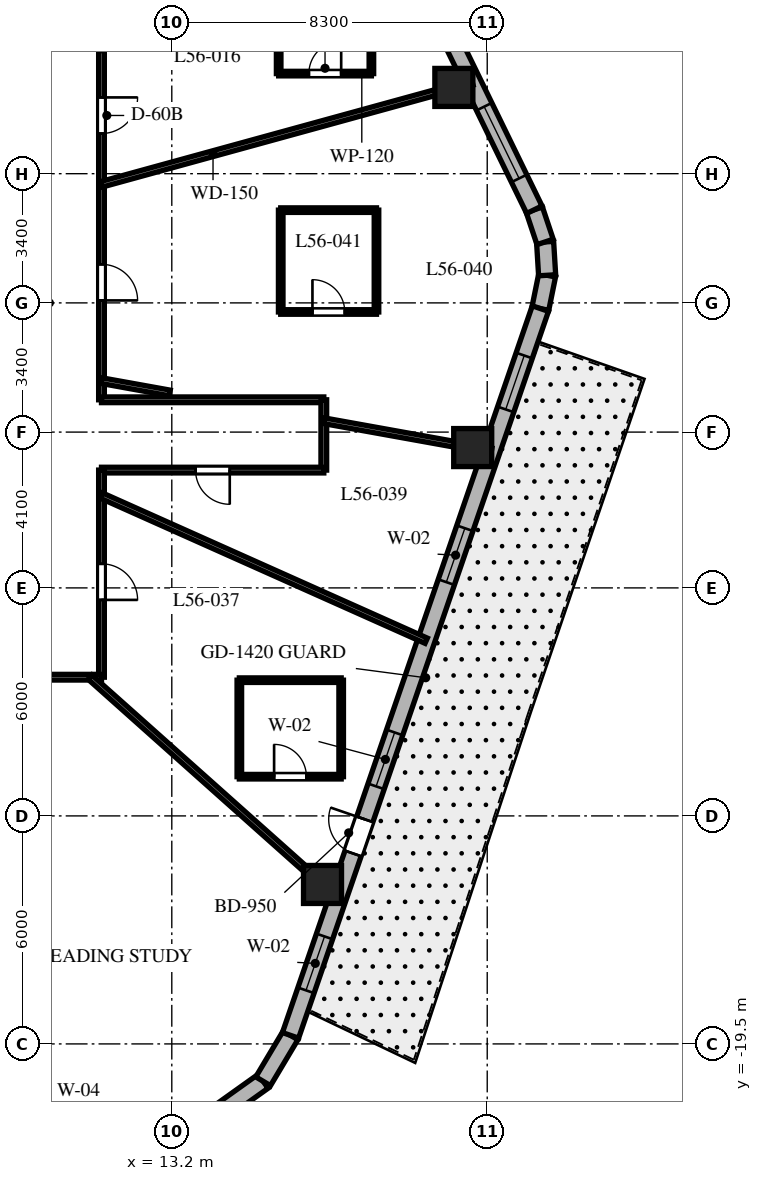
"""IFC4 building model, lengths in metres.
Left out: names, types, materials, properties, quantities, classifications, styles, units other than length and angle.
Written with IfcOpenShell. Run it as: python <this file> out.ifc"""

import sys

from ifc_helpers import new_model, si_unit, direction, frame, frame_2d, origin, origin_2d, place, context, subcontext, project, spatial, rectangle, extrude, element, fill, save


model = new_model("IFC4")
c1 = context("Model", 3, precision=1e-05, world=origin(), true_north=direction((0.0, 1.0)))
c2 = subcontext(c1, "Body", "Model", "MODEL_VIEW")
j1 = project(units=[si_unit("LENGTHUNIT", "METRE"), si_unit("PLANEANGLEUNIT", "RADIAN")], contexts=[c1])
p1 = place(None, origin())
s1 = spatial("IfcSite", under=j1, at=p1, CompositionType="ELEMENT")
p2 = place(p1, origin())
s2 = spatial("IfcBuilding", under=s1, at=p2, CompositionType="ELEMENT")
p3 = place(p2, frame((0.0, 0.0, 225.5)))
s3 = spatial("IfcBuildingStorey", under=s2, at=p3, CompositionType="ELEMENT", Elevation=225.5)
for number, where, z_axis, x_axis in (
    (1, (17.166, -15.304, 0.0), (0.0, 0.0, 1.0), (1.0, 0.0, 0.0)),
    (2, (21.118, -3.807, 0.0), (0.0, 0.0, 1.0), (1.0, 0.0, 0.0)),
    (3, (20.622, 5.67, 0.0), (0.0, 0.0, 1.0), (1.0, 0.0, 0.0)),
):
    element("IfcColumn", number, at=place(p3, frame(where, z_axis=z_axis, x_axis=x_axis)), inside=s3, PredefinedType="COLUMN", context=c2, shape_type="SweptSolid", body=[
        extrude(rectangle(XDim=1.0, YDim=1.0, at=origin_2d()), origin(), (0.0, 0.0, 1.0), 3.8),
    ])
p4 = place(p3, frame((14.478, -21.287, 0.0), z_axis=(0.0, 0.0, 1.0), x_axis=(0.813888518617, 0.58102106611, 0.0)))
e4 = element("IfcWall", 4, at=p4, inside=s3, PredefinedType="SOLIDWALL", context=c2, shape_type="SweptSolid", body=[
    extrude(rectangle(XDim=1.383, YDim=0.45, at=frame_2d((0.691, 0.0))), origin(), (0.0, 0.0, 1.0), 3.5),
])
p5 = place(p3, frame((15.604, -20.483, 0.0), z_axis=(0.0, 0.0, 1.0), x_axis=(0.512222149036, 0.858852996756, 0.0)))
e5 = element("IfcWall", 5, at=p5, inside=s3, PredefinedType="SOLIDWALL", context=c2, shape_type="SweptSolid", body=[
    extrude(rectangle(XDim=1.406, YDim=0.45, at=frame_2d((0.703, 0.0))), origin(), (0.0, 0.0, 1.0), 3.5),
])
p6 = place(p3, frame((22.898, -0.15, 0.0), z_axis=(0.0, 0.0, 1.0), x_axis=(0.199055826889, 0.979988151858, 0.0)))
e6 = element("IfcWall", 6, at=p6, inside=s3, PredefinedType="SOLIDWALL", context=c2, shape_type="SweptSolid", body=[
    extrude(rectangle(XDim=0.894, YDim=0.45, at=frame_2d((0.447, 0.0))), origin(), (0.0, 0.0, 1.0), 3.5),
])
p7 = place(p3, frame((23.076, 0.727, 0.0), z_axis=(0.0, 0.0, 1.0), x_axis=(-0.060805222108, 0.998149650586, 0.0)))
e7 = element("IfcWall", 7, at=p7, inside=s3, PredefinedType="SOLIDWALL", context=c2, shape_type="SweptSolid", body=[
    extrude(rectangle(XDim=0.879, YDim=0.45, at=frame_2d((0.44, 0.0))), origin(), (0.0, 0.0, 1.0), 3.5),
])
p8 = place(p3, frame((23.023, 1.604, 0.0), z_axis=(0.0, 0.0, 1.0), x_axis=(-0.316801227695, 0.948491951537, 0.0)))
e8 = element("IfcWall", 8, at=p8, inside=s3, PredefinedType="SOLIDWALL", context=c2, shape_type="SweptSolid", body=[
    extrude(rectangle(XDim=0.894, YDim=0.45, at=frame_2d((0.447, 0.0))), origin(), (0.0, 0.0, 1.0), 3.5),
])
p9 = place(p3, frame((16.324, -19.275, 0.0), z_axis=(0.0, 0.0, 1.0), x_axis=(0.325083142304, 0.945685439557, 0.0)))
e9 = element("IfcWall", 9, at=p9, inside=s3, PredefinedType="SOLIDWALL", context=c2, shape_type="SweptSolid", body=[
    extrude(rectangle(XDim=20.224, YDim=0.45, at=frame_2d((10.112, 0.0))), origin(), (0.0, 0.0, 1.0), 3.5),
])
p10 = place(p9, frame((5.062, 0.0, 0.0)))
e10 = element("IfcOpeningElement", 10, at=p10, cuts=e9, PredefinedType="OPENING", context=c2, shape_type="SweptSolid", body=[
    extrude(rectangle(XDim=0.95, YDim=2.15, at=frame_2d((0.475, 1.075))), frame((0.0, 0.235, 0.0), z_axis=(0.0, -1.0, 0.0), x_axis=(1.0, 0.0, 0.0)), (0.0, 0.0, 1.0), 0.47),
])
p11 = place(p9, frame((1.253, 0.0, 0.8)))
e11 = element("IfcOpeningElement", 11, at=p11, cuts=e9, PredefinedType="OPENING", context=c2, shape_type="SweptSolid", body=[
    extrude(rectangle(XDim=1.5, YDim=1.8, at=frame_2d((0.75, 0.9))), frame((0.0, 0.235, 0.0), z_axis=(0.0, -1.0, 0.0), x_axis=(1.0, 0.0, 0.0)), (0.0, 0.0, 1.0), 0.47),
])
p12 = place(p9, frame((6.929, 0.0, 0.8)))
e12 = element("IfcOpeningElement", 12, at=p12, cuts=e9, PredefinedType="OPENING", context=c2, shape_type="SweptSolid", body=[
    extrude(rectangle(XDim=1.5, YDim=1.8, at=frame_2d((0.75, 0.9))), frame((0.0, 0.235, 0.0), z_axis=(0.0, -1.0, 0.0), x_axis=(1.0, 0.0, 0.0)), (0.0, 0.0, 1.0), 0.47),
])
p13 = place(p9, frame((12.612, 0.0, 0.8)))
e13 = element("IfcOpeningElement", 13, at=p13, cuts=e9, PredefinedType="OPENING", context=c2, shape_type="SweptSolid", body=[
    extrude(rectangle(XDim=1.5, YDim=1.8, at=frame_2d((0.75, 0.9))), frame((0.0, 0.235, 0.0), z_axis=(0.0, -1.0, 0.0), x_axis=(1.0, 0.0, 0.0)), (0.0, 0.0, 1.0), 0.47),
])
p14 = place(p9, frame((17.418, 0.0, 0.8)))
e14 = element("IfcOpeningElement", 14, at=p14, cuts=e9, PredefinedType="OPENING", context=c2, shape_type="SweptSolid", body=[
    extrude(rectangle(XDim=1.5, YDim=1.8, at=frame_2d((0.75, 0.9))), frame((0.0, 0.235, 0.0), z_axis=(0.0, -1.0, 0.0), x_axis=(1.0, 0.0, 0.0)), (0.0, 0.0, 1.0), 0.47),
])
p15 = place(p3, frame((22.74, 2.452, 0.0), z_axis=(0.0, 0.0, 1.0), x_axis=(-0.437753424814, 0.899095066755, 0.0)))
e15 = element("IfcWall", 15, at=p15, inside=s3, PredefinedType="SOLIDWALL", context=c2, shape_type="SweptSolid", body=[
    extrude(rectangle(XDim=19.137, YDim=0.45, at=frame_2d((9.569, 0.0))), origin(), (0.0, 0.0, 1.0), 3.5),
])
p16 = place(p15, frame((5.805, 0.0, 0.8)))
e16 = element("IfcOpeningElement", 16, at=p16, cuts=e15, PredefinedType="OPENING", context=c2, shape_type="SweptSolid", body=[
    extrude(rectangle(XDim=2.1, YDim=1.85, at=frame_2d((1.05, 0.925))), frame((0.0, 0.235, 0.0), z_axis=(0.0, -1.0, 0.0), x_axis=(1.0, 0.0, 0.0)), (0.0, 0.0, 1.0), 0.47),
])
p17 = place(p15, frame((11.199, 0.0, 0.8)))
e17 = element("IfcOpeningElement", 17, at=p17, cuts=e15, PredefinedType="OPENING", context=c2, shape_type="SweptSolid", body=[
    extrude(rectangle(XDim=2.1, YDim=1.85, at=frame_2d((1.05, 0.925))), frame((0.0, 0.235, 0.0), z_axis=(0.0, -1.0, 0.0), x_axis=(1.0, 0.0, 0.0)), (0.0, 0.0, 1.0), 0.47),
])
p18 = place(p15, frame((16.173, 0.0, 0.8)))
e18 = element("IfcOpeningElement", 18, at=p18, cuts=e15, PredefinedType="OPENING", context=c2, shape_type="SweptSolid", body=[
    extrude(rectangle(XDim=2.1, YDim=1.85, at=frame_2d((1.05, 0.925))), frame((0.0, 0.235, 0.0), z_axis=(0.0, -1.0, 0.0), x_axis=(1.0, 0.0, 0.0)), (0.0, 0.0, 1.0), 0.47),
])
p19 = place(p15, frame((0.916, 0.0, 0.8)))
e19 = element("IfcOpeningElement", 19, at=p19, cuts=e15, PredefinedType="OPENING", context=c2, shape_type="SweptSolid", body=[
    extrude(rectangle(XDim=2.1, YDim=1.85, at=frame_2d((1.05, 0.925))), frame((0.0, 0.235, 0.0), z_axis=(0.0, -1.0, 0.0), x_axis=(1.0, 0.0, 0.0)), (0.0, 0.0, 1.0), 0.47),
])
p20 = place(p3, frame((11.35, 9.85, 0.0), z_axis=(0.0, 0.0, 1.0), x_axis=(0.0, -1.0, 0.0)))
e20 = element("IfcWall", 20, at=p20, inside=s3, PredefinedType="PARTITIONING", context=c2, shape_type="SweptSolid", body=[
    extrude(rectangle(XDim=12.4, YDim=0.15, at=frame_2d((6.2, 0.0))), origin(), (0.0, 0.0, 1.0), 2.99),
])
p21 = place(p20, frame((4.443, 0.0, 0.0)))
e21 = element("IfcOpeningElement", 21, at=p21, cuts=e20, PredefinedType="OPENING", context=c2, shape_type="SweptSolid", body=[
    extrude(rectangle(XDim=0.95, YDim=2.03, at=frame_2d((0.475, 1.015))), frame((0.0, 0.085, 0.0), z_axis=(0.0, -1.0, 0.0), x_axis=(1.0, 0.0, 0.0)), (0.0, 0.0, 1.0), 0.17),
])
p22 = place(p20, frame((1.242, 0.0, 0.0)))
e22 = element("IfcOpeningElement", 22, at=p22, cuts=e20, PredefinedType="OPENING", context=c2, shape_type="SweptSolid", body=[
    extrude(rectangle(XDim=0.9, YDim=2.03, at=frame_2d((0.45, 1.015))), frame((0.0, 0.085, 0.0), z_axis=(0.0, -1.0, 0.0), x_axis=(1.0, 0.0, 0.0)), (0.0, 0.0, 1.0), 0.17),
])
p23 = place(p20, frame((8.835, 0.0, 0.0)))
e23 = element("IfcOpeningElement", 23, at=p23, cuts=e20, PredefinedType="OPENING", context=c2, shape_type="SweptSolid", body=[
    extrude(rectangle(XDim=0.95, YDim=2.03, at=frame_2d((0.475, 1.015))), frame((0.0, 0.085, 0.0), z_axis=(0.0, -1.0, 0.0), x_axis=(1.0, 0.0, 0.0)), (0.0, 0.0, 1.0), 0.17),
])
p24 = place(p3, frame((11.35, -2.55, 0.0), z_axis=(0.0, 0.0, 1.0), x_axis=(1.0, 0.0, 0.0)))
e24 = element("IfcWall", 24, at=p24, inside=s3, PredefinedType="PARTITIONING", context=c2, shape_type="SweptSolid", body=[
    extrude(rectangle(XDim=5.85, YDim=0.15, at=frame_2d((2.925, 0.0))), origin(), (0.0, 0.0, 1.0), 2.94),
])
p25 = place(p3, frame((17.2, -2.55, 0.0), z_axis=(0.0, 0.0, 1.0), x_axis=(0.0, -1.0, 0.0)))
e25 = element("IfcWall", 25, at=p25, inside=s3, PredefinedType="PARTITIONING", context=c2, shape_type="SweptSolid", body=[
    extrude(rectangle(XDim=1.85, YDim=0.15, at=frame_2d((0.925, 0.0))), origin(), (0.0, 0.0, 1.0), 2.94),
])
p26 = place(p3, frame((17.2, -4.4, 0.0), z_axis=(0.0, 0.0, 1.0), x_axis=(-1.0, 0.0, 0.0)))
e26 = element("IfcWall", 26, at=p26, inside=s3, PredefinedType="PARTITIONING", context=c2, shape_type="SweptSolid", body=[
    extrude(rectangle(XDim=5.85, YDim=0.15, at=frame_2d((2.925, 0.0))), origin(), (0.0, 0.0, 1.0), 2.94),
])
p27 = place(p26, frame((2.475, 0.0, 0.0)))
e27 = element("IfcOpeningElement", 27, at=p27, cuts=e26, PredefinedType="OPENING", context=c2, shape_type="SweptSolid", body=[
    extrude(rectangle(XDim=0.9, YDim=2.03, at=frame_2d((0.45, 1.015))), frame((0.0, 0.085, 0.0), z_axis=(0.0, -1.0, 0.0), x_axis=(1.0, 0.0, 0.0)), (0.0, 0.0, 1.0), 0.17),
])
p28 = place(p3, frame((11.35, -4.4, 0.0), z_axis=(0.0, 0.0, 1.0), x_axis=(0.0, -1.0, 0.0)))
e28 = element("IfcWall", 28, at=p28, inside=s3, PredefinedType="PARTITIONING", context=c2, shape_type="SweptSolid", body=[
    extrude(rectangle(XDim=5.45, YDim=0.15, at=frame_2d((2.725, 0.0))), origin(), (0.0, 0.0, 1.0), 2.99),
])
p29 = place(p28, frame((2.466, 0.0, 0.0)))
e29 = element("IfcOpeningElement", 29, at=p29, cuts=e28, PredefinedType="OPENING", context=c2, shape_type="SweptSolid", body=[
    extrude(rectangle(XDim=0.95, YDim=2.03, at=frame_2d((0.475, 1.015))), frame((0.0, 0.085, 0.0), z_axis=(0.0, -1.0, 0.0), x_axis=(1.0, 0.0, 0.0)), (0.0, 0.0, 1.0), 0.17),
])
p30 = place(p3, frame((11.35, -9.85, 0.0), z_axis=(0.0, 0.0, 1.0), x_axis=(-1.0, 0.0, 0.0)))
e30 = element("IfcWall", 30, at=p30, inside=s3, PredefinedType="PARTITIONING", context=c2, shape_type="SweptSolid", body=[
    extrude(rectangle(XDim=10.43, YDim=0.15, at=frame_2d((5.215, 0.0))), origin(), (0.0, 0.0, 1.0), 2.99),
])
p31 = place(p30, frame((8.362, 0.0, 0.0)))
e31 = element("IfcOpeningElement", 31, at=p31, cuts=e30, PredefinedType="OPENING", context=c2, shape_type="SweptSolid", body=[
    extrude(rectangle(XDim=0.95, YDim=2.03, at=frame_2d((0.475, 1.015))), frame((0.0, 0.085, 0.0), z_axis=(0.0, -1.0, 0.0), x_axis=(1.0, 0.0, 0.0)), (0.0, 0.0, 1.0), 0.17),
])
p32 = place(p30, frame((3.396, 0.0, 0.0)))
e32 = element("IfcOpeningElement", 32, at=p32, cuts=e30, PredefinedType="OPENING", context=c2, shape_type="SweptSolid", body=[
    extrude(rectangle(XDim=0.95, YDim=2.03, at=frame_2d((0.475, 1.015))), frame((0.0, 0.085, 0.0), z_axis=(0.0, -1.0, 0.0), x_axis=(1.0, 0.0, 0.0)), (0.0, 0.0, 1.0), 0.17),
])
p33 = place(p3, frame((11.35, 3.121, 0.0), z_axis=(0.0, 0.0, 1.0), x_axis=(0.964212793822, 0.265129568758, 0.0)))
e33 = element("IfcWall", 33, at=p33, inside=s3, PredefinedType="PARTITIONING", context=c2, shape_type="SweptSolid", body=[
    extrude(rectangle(XDim=10.12, YDim=0.15, at=frame_2d((5.06, 0.0))), origin(), (0.0, 0.0, 1.0), 2.74),
])
p34 = place(p3, frame((11.048, -9.85, 0.0), z_axis=(0.0, 0.0, 1.0), x_axis=(0.746444434655, -0.665447748492, 0.0)))
e34 = element("IfcWall", 34, at=p34, inside=s3, PredefinedType="PARTITIONING", context=c2, shape_type="SweptSolid", body=[
    extrude(rectangle(XDim=8.732, YDim=0.15, at=frame_2d((4.366, 0.0))), origin(), (0.0, 0.0, 1.0), 2.74),
])
p35 = place(p3, frame((11.35, -5.072, 0.0), z_axis=(0.0, 0.0, 1.0), x_axis=(0.912980177983, -0.408003914944, 0.0)))
e35 = element("IfcWall", 35, at=p35, inside=s3, PredefinedType="PARTITIONING", context=c2, shape_type="SweptSolid", body=[
    extrude(rectangle(XDim=9.358, YDim=0.15, at=frame_2d((4.679, 0.0))), origin(), (0.0, 0.0, 1.0), 2.74),
])
p36 = place(p3, frame((11.35, -2.046, 0.0), z_axis=(0.0, 0.0, 1.0), x_axis=(0.984127783205, -0.177461281195, 0.0)))
e36 = element("IfcWall", 36, at=p36, inside=s3, PredefinedType="PARTITIONING", context=c2, shape_type="SweptSolid", body=[
    extrude(rectangle(XDim=1.826, YDim=0.15, at=frame_2d((0.913, 0.0))), origin(), (0.0, 0.0, 1.0), 3.5),
])
p37 = place(p3, frame((17.2, -3.101, 0.0), z_axis=(0.0, 0.0, 1.0), x_axis=(0.98413465883, -0.177423147559, 0.0)))
e37 = element("IfcWall", 37, at=p37, inside=s3, PredefinedType="PARTITIONING", context=c2, shape_type="SweptSolid", body=[
    extrude(rectangle(XDim=4.482, YDim=0.15, at=frame_2d((2.241, 0.0))), origin(), (0.0, 0.0, 1.0), 2.74),
])
p38 = place(p3, frame((16.012, 6.034, 0.0), z_axis=(0.0, 0.0, 1.0), x_axis=(1.0, 0.0, 0.0)))
e38 = element("IfcWall", 38, at=p38, inside=s3, PredefinedType="PARTITIONING", context=c2, shape_type="SweptSolid", body=[
    extrude(rectangle(XDim=2.44, YDim=0.12, at=frame_2d((1.22, 0.0))), origin(), (0.0, 0.0, 1.0), 2.94),
])
p39 = place(p38, frame((0.795, 0.0, 0.0)))
e39 = element("IfcOpeningElement", 39, at=p39, cuts=e38, PredefinedType="OPENING", context=c2, shape_type="SweptSolid", body=[
    extrude(rectangle(XDim=0.85, YDim=2.03, at=frame_2d((0.425, 1.015))), frame((0.0, 0.07, 0.0), z_axis=(0.0, -1.0, 0.0), x_axis=(1.0, 0.0, 0.0)), (0.0, 0.0, 1.0), 0.14),
])
for number, where, z_axis, x_axis in (
    (40, (18.452, 6.034, 0.0), (0.0, 0.0, 1.0), (0.0, 1.0, 0.0)),
    (41, (16.012, 8.644, 0.0), (0.0, 0.0, 1.0), (0.0, -1.0, 0.0)),
):
    element("IfcWall", number, at=place(p3, frame(where, z_axis=z_axis, x_axis=x_axis)), inside=s3, PredefinedType="PARTITIONING", context=c2, shape_type="SweptSolid", body=[
        extrude(rectangle(XDim=2.61, YDim=0.12, at=frame_2d((1.305, 0.0))), origin(), (0.0, 0.0, 1.0), 2.99),
    ])
p40 = place(p3, frame((14.977, -12.468, 0.0), z_axis=(0.0, 0.0, 1.0), x_axis=(1.0, 0.0, 0.0)))
e42 = element("IfcWall", 42, at=p40, inside=s3, PredefinedType="PARTITIONING", context=c2, shape_type="SweptSolid", body=[
    extrude(rectangle(XDim=2.68, YDim=0.12, at=frame_2d((1.34, 0.0))), origin(), (0.0, 0.0, 1.0), 3.5),
])
p41 = place(p40, frame((0.915, 0.0, 0.0)))
e43 = element("IfcOpeningElement", 43, at=p41, cuts=e42, PredefinedType="OPENING", context=c2, shape_type="SweptSolid", body=[
    extrude(rectangle(XDim=0.85, YDim=2.03, at=frame_2d((0.425, 1.015))), frame((0.0, 0.07, 0.0), z_axis=(0.0, -1.0, 0.0), x_axis=(1.0, 0.0, 0.0)), (0.0, 0.0, 1.0), 0.14),
])
p42 = place(p3, frame((17.657, -12.468, 0.0), z_axis=(0.0, 0.0, 1.0), x_axis=(0.0, 1.0, 0.0)))
e44 = element("IfcWall", 44, at=p42, inside=s3, PredefinedType="PARTITIONING", context=c2, shape_type="SweptSolid", body=[
    extrude(rectangle(XDim=2.54, YDim=0.12, at=frame_2d((1.27, 0.0))), origin(), (0.0, 0.0, 1.0), 3.5),
])
p43 = place(p3, frame((17.657, -9.928, 0.0), z_axis=(0.0, 0.0, 1.0), x_axis=(-1.0, 0.0, 0.0)))
e45 = element("IfcWall", 45, at=p43, inside=s3, PredefinedType="PARTITIONING", context=c2, shape_type="SweptSolid", body=[
    extrude(rectangle(XDim=2.68, YDim=0.12, at=frame_2d((1.34, 0.0))), origin(), (0.0, 0.0, 1.0), 3.073),
])
p44 = place(p3, frame((14.977, -9.928, 0.0), z_axis=(0.0, 0.0, 1.0), x_axis=(0.0, -1.0, 0.0)))
e46 = element("IfcWall", 46, at=p44, inside=s3, PredefinedType="PARTITIONING", context=c2, shape_type="SweptSolid", body=[
    extrude(rectangle(XDim=2.54, YDim=0.12, at=frame_2d((1.27, 0.0))), origin(), (0.0, 0.0, 1.0), 3.073),
])
p45 = place(p3, frame((16.066, -0.239, 0.0), z_axis=(0.0, 0.0, 1.0), x_axis=(1.0, 0.0, 0.0)))
e47 = element("IfcWall", 47, at=p45, inside=s3, PredefinedType="PARTITIONING", context=c2, shape_type="SweptSolid", body=[
    extrude(rectangle(XDim=2.52, YDim=0.12, at=frame_2d((1.26, 0.0))), origin(), (0.0, 0.0, 1.0), 2.94),
])
p46 = place(p45, frame((0.835, 0.0, 0.0)))
e48 = element("IfcOpeningElement", 48, at=p46, cuts=e47, PredefinedType="OPENING", context=c2, shape_type="SweptSolid", body=[
    extrude(rectangle(XDim=0.85, YDim=2.03, at=frame_2d((0.425, 1.015))), frame((0.0, 0.07, 0.0), z_axis=(0.0, -1.0, 0.0), x_axis=(1.0, 0.0, 0.0)), (0.0, 0.0, 1.0), 0.14),
])
p47 = place(p3, frame((18.586, -0.239, 0.0), z_axis=(0.0, 0.0, 1.0), x_axis=(0.0, 1.0, 0.0)))
e49 = element("IfcWall", 49, at=p47, inside=s3, PredefinedType="PARTITIONING", context=c2, shape_type="SweptSolid", body=[
    extrude(rectangle(XDim=2.68, YDim=0.12, at=frame_2d((1.34, 0.0))), origin(), (0.0, 0.0, 1.0), 3.5),
])
p48 = place(p3, frame((18.586, 2.441, 0.0), z_axis=(0.0, 0.0, 1.0), x_axis=(-1.0, 0.0, 0.0)))
e50 = element("IfcWall", 50, at=p48, inside=s3, PredefinedType="PARTITIONING", context=c2, shape_type="SweptSolid", body=[
    extrude(rectangle(XDim=2.52, YDim=0.12, at=frame_2d((1.26, 0.0))), origin(), (0.0, 0.0, 1.0), 2.94),
])
p49 = place(p3, frame((16.066, 2.441, 0.0), z_axis=(0.0, 0.0, 1.0), x_axis=(0.0, -1.0, 0.0)))
e51 = element("IfcWall", 51, at=p49, inside=s3, PredefinedType="PARTITIONING", context=c2, shape_type="SweptSolid", body=[
    extrude(rectangle(XDim=2.68, YDim=0.12, at=frame_2d((1.34, 0.0))), origin(), (0.0, 0.0, 1.0), 3.5),
])
p50 = place(p10, origin())
e52 = element("IfcDoor", 52, at=p50, inside=s3, OperationType="SINGLE_SWING_RIGHT", PredefinedType="DOOR", context=c2, shape_type="SweptSolid", body=[
    extrude(rectangle(XDim=0.95, YDim=2.15, at=frame_2d((0.475, 1.075))), frame((0.0, 0.025, 0.0), z_axis=(0.0, -1.0, 0.0), x_axis=(1.0, 0.0, 0.0)), (0.0, 0.0, 1.0), 0.05),
])
fill(e10, e52)
p51 = place(p11, origin())
e53 = element("IfcWindow", 53, at=p51, inside=s3, PartitioningType="SINGLE_PANEL", PredefinedType="WINDOW", context=c2, shape_type="SweptSolid", body=[
    extrude(rectangle(XDim=1.5, YDim=1.8, at=frame_2d((0.75, 0.9))), frame((0.0, 0.03, 0.0), z_axis=(0.0, -1.0, 0.0), x_axis=(1.0, 0.0, 0.0)), (0.0, 0.0, 1.0), 0.06),
])
fill(e11, e53)
p52 = place(p12, origin())
e54 = element("IfcWindow", 54, at=p52, inside=s3, PartitioningType="SINGLE_PANEL", PredefinedType="WINDOW", context=c2, shape_type="SweptSolid", body=[
    extrude(rectangle(XDim=1.5, YDim=1.8, at=frame_2d((0.75, 0.9))), frame((0.0, 0.03, 0.0), z_axis=(0.0, -1.0, 0.0), x_axis=(1.0, 0.0, 0.0)), (0.0, 0.0, 1.0), 0.06),
])
fill(e12, e54)
p53 = place(p13, origin())
e55 = element("IfcWindow", 55, at=p53, inside=s3, PartitioningType="SINGLE_PANEL", PredefinedType="WINDOW", context=c2, shape_type="SweptSolid", body=[
    extrude(rectangle(XDim=1.5, YDim=1.8, at=frame_2d((0.75, 0.9))), frame((0.0, 0.03, 0.0), z_axis=(0.0, -1.0, 0.0), x_axis=(1.0, 0.0, 0.0)), (0.0, 0.0, 1.0), 0.06),
])
fill(e13, e55)
p54 = place(p14, origin())
e56 = element("IfcWindow", 56, at=p54, inside=s3, PartitioningType="SINGLE_PANEL", PredefinedType="WINDOW", context=c2, shape_type="SweptSolid", body=[
    extrude(rectangle(XDim=1.5, YDim=1.8, at=frame_2d((0.75, 0.9))), frame((0.0, 0.03, 0.0), z_axis=(0.0, -1.0, 0.0), x_axis=(1.0, 0.0, 0.0)), (0.0, 0.0, 1.0), 0.06),
])
fill(e14, e56)
p55 = place(p19, origin())
e57 = element("IfcWindow", 57, at=p55, inside=s3, PartitioningType="SINGLE_PANEL", PredefinedType="WINDOW", context=c2, shape_type="SweptSolid", body=[
    extrude(rectangle(XDim=2.1, YDim=1.85, at=frame_2d((1.05, 0.925))), frame((0.0, 0.03, 0.0), z_axis=(0.0, -1.0, 0.0), x_axis=(1.0, 0.0, 0.0)), (0.0, 0.0, 1.0), 0.06),
])
fill(e19, e57)
p56 = place(p21, origin())
e58 = element("IfcDoor", 58, at=p56, inside=s3, OperationType="SINGLE_SWING_LEFT", PredefinedType="DOOR", context=c2, shape_type="SweptSolid", body=[
    extrude(rectangle(XDim=0.95, YDim=2.03, at=frame_2d((0.475, 1.015))), frame((0.0, 0.025, 0.0), z_axis=(0.0, -1.0, 0.0), x_axis=(1.0, 0.0, 0.0)), (0.0, 0.0, 1.0), 0.05),
])
fill(e21, e58)
p57 = place(p39, origin())
e59 = element("IfcDoor", 59, at=p57, inside=s3, OperationType="SINGLE_SWING_RIGHT", PredefinedType="DOOR", context=c2, shape_type="SweptSolid", body=[
    extrude(rectangle(XDim=0.85, YDim=2.03, at=frame_2d((0.425, 1.015))), frame((0.0, 0.025, 0.0), z_axis=(0.0, -1.0, 0.0), x_axis=(1.0, 0.0, 0.0)), (0.0, 0.0, 1.0), 0.05),
])
fill(e39, e59)
p58 = place(p29, origin())
e60 = element("IfcDoor", 60, at=p58, inside=s3, OperationType="SINGLE_SWING_RIGHT", PredefinedType="DOOR", context=c2, shape_type="SweptSolid", body=[
    extrude(rectangle(XDim=0.95, YDim=2.03, at=frame_2d((0.475, 1.015))), frame((0.0, 0.025, 0.0), z_axis=(0.0, -1.0, 0.0), x_axis=(1.0, 0.0, 0.0)), (0.0, 0.0, 1.0), 0.05),
])
fill(e29, e60)
p59 = place(p41, origin())
e61 = element("IfcDoor", 61, at=p59, inside=s3, OperationType="SINGLE_SWING_LEFT", PredefinedType="DOOR", context=c2, shape_type="SweptSolid", body=[
    extrude(rectangle(XDim=0.85, YDim=2.03, at=frame_2d((0.425, 1.015))), frame((0.0, 0.025, 0.0), z_axis=(0.0, -1.0, 0.0), x_axis=(1.0, 0.0, 0.0)), (0.0, 0.0, 1.0), 0.05),
])
fill(e43, e61)
p60 = place(p27, origin())
e62 = element("IfcDoor", 62, at=p60, inside=s3, OperationType="SINGLE_SWING_LEFT", PredefinedType="DOOR", context=c2, shape_type="SweptSolid", body=[
    extrude(rectangle(XDim=0.9, YDim=2.03, at=frame_2d((0.45, 1.015))), frame((0.0, 0.025, 0.0), z_axis=(0.0, -1.0, 0.0), x_axis=(1.0, 0.0, 0.0)), (0.0, 0.0, 1.0), 0.05),
])
fill(e27, e62)
p61 = place(p23, origin())
e63 = element("IfcDoor", 63, at=p61, inside=s3, OperationType="SINGLE_SWING_RIGHT", PredefinedType="DOOR", context=c2, shape_type="SweptSolid", body=[
    extrude(rectangle(XDim=0.95, YDim=2.03, at=frame_2d((0.475, 1.015))), frame((0.0, 0.025, 0.0), z_axis=(0.0, -1.0, 0.0), x_axis=(1.0, 0.0, 0.0)), (0.0, 0.0, 1.0), 0.05),
])
fill(e23, e63)
p62 = place(p46, origin())
e64 = element("IfcDoor", 64, at=p62, inside=s3, OperationType="SINGLE_SWING_LEFT", PredefinedType="DOOR", context=c2, shape_type="SweptSolid", body=[
    extrude(rectangle(XDim=0.85, YDim=2.03, at=frame_2d((0.425, 1.015))), frame((0.0, 0.025, 0.0), z_axis=(0.0, -1.0, 0.0), x_axis=(1.0, 0.0, 0.0)), (0.0, 0.0, 1.0), 0.05),
])
fill(e48, e64)
save(model, sys.argv[1])
